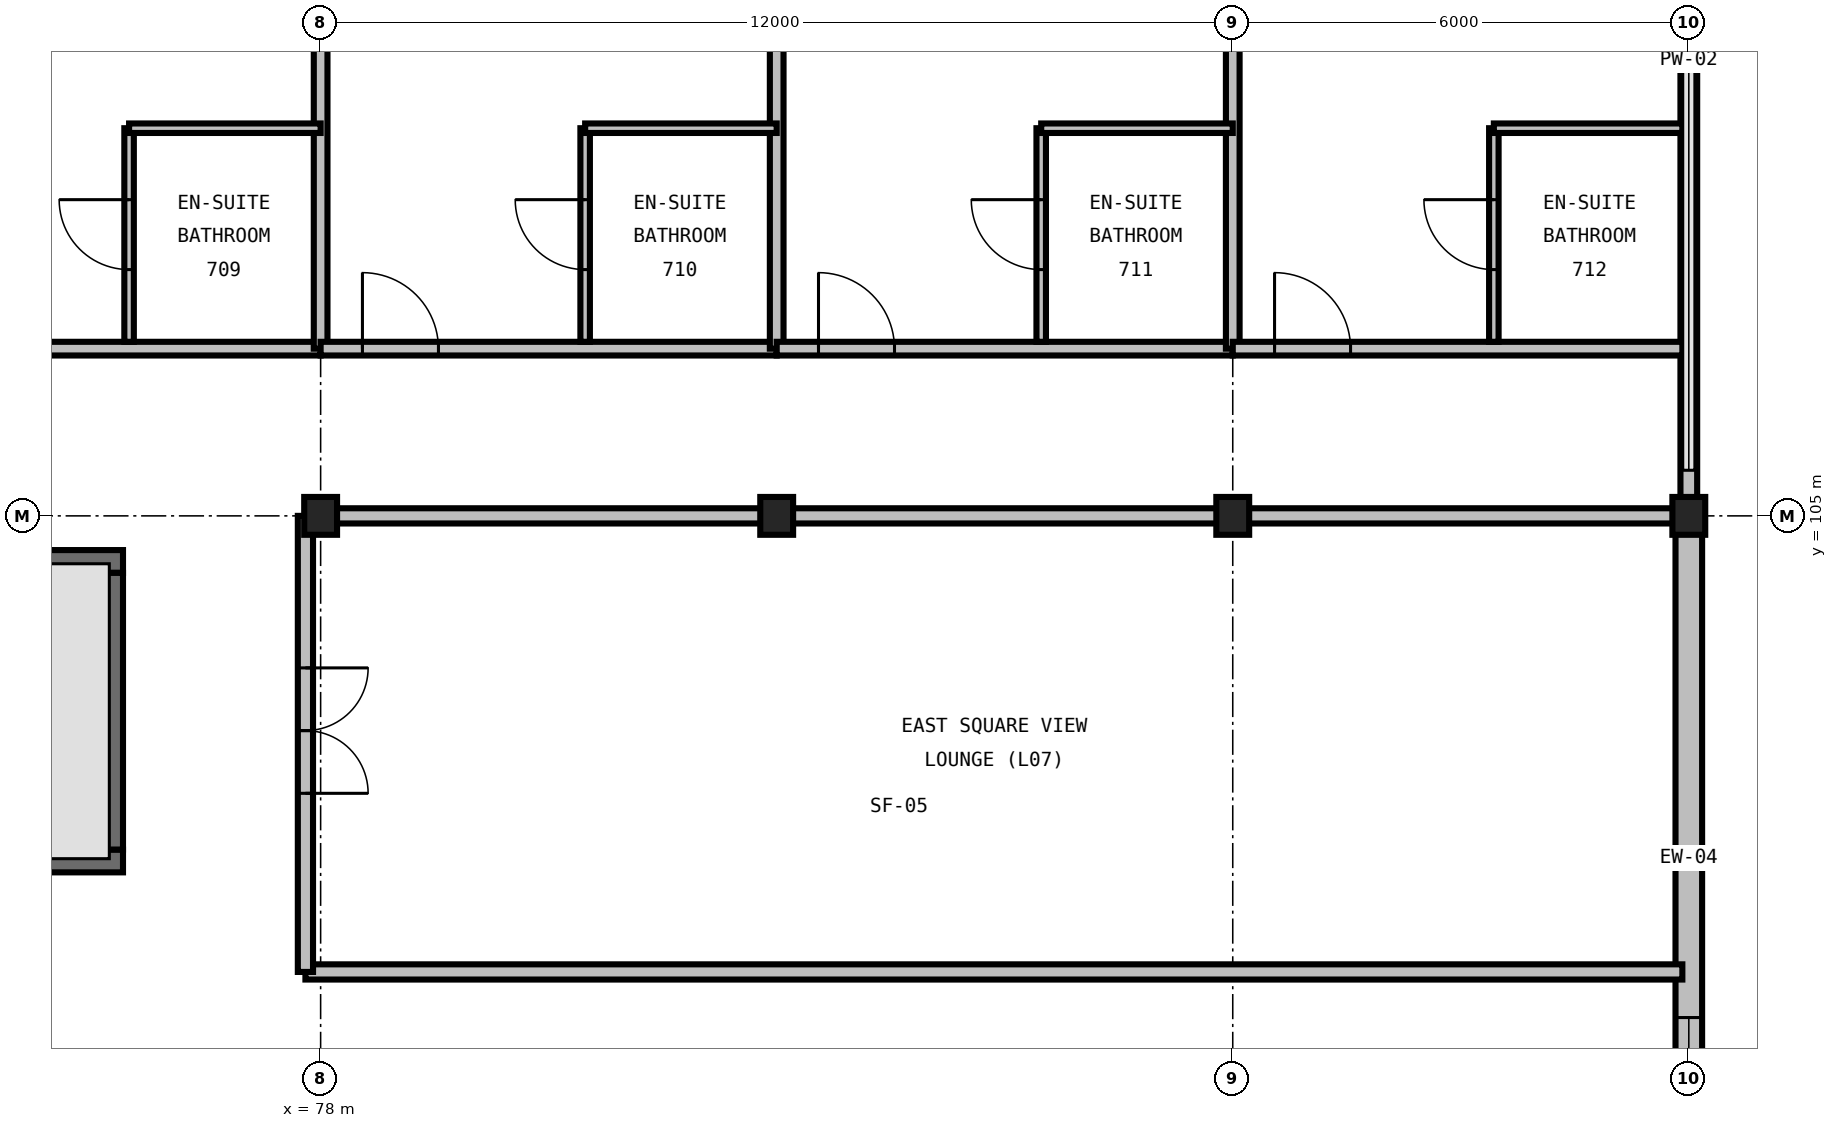
"""IFC4 building model, lengths in metres.
Left out: names, types, materials, properties, quantities, classifications, styles, units other than length and angle.
Written with IfcOpenShell. Run it as: python <this file> out.ifc"""

import sys

from ifc_helpers import new_model, si_unit, direction, frame, frame_2d, origin, origin_2d, place, context, subcontext, project, spatial, rectangle, i_section, extrude, element, fill, save


model = new_model("IFC4")
c1 = context("Model", 3, precision=1e-05, world=origin(), true_north=direction((0.0, 1.0)))
c2 = subcontext(c1, "Body", "Model", "MODEL_VIEW")
j1 = project(units=[si_unit("LENGTHUNIT", "METRE"), si_unit("PLANEANGLEUNIT", "RADIAN")], contexts=[c1])
p1 = place(None, origin())
s1 = spatial("IfcSite", under=j1, at=p1, CompositionType="ELEMENT")
p2 = place(p1, origin())
s2 = spatial("IfcBuilding", under=s1, at=p2, CompositionType="ELEMENT")
p3 = place(p2, frame((0.0, 0.0, 34.8)))
s3 = spatial("IfcBuildingStorey", under=s2, at=p3, CompositionType="ELEMENT", Elevation=34.8)
for number, where, z_axis, x_axis in (
    (1, (78.0, 105.0, 0.0), (0.0, 0.0, 1.0), (1.0, 0.0, 0.0)),
    (2, (84.0, 105.0, 0.0), (0.0, 0.0, 1.0), (1.0, 0.0, 0.0)),
    (3, (90.0, 105.0, 0.0), (0.0, 0.0, 1.0), (1.0, 0.0, 0.0)),
    (4, (96.0, 105.0, 0.0), (0.0, 0.0, 1.0), (1.0, 0.0, 0.0)),
):
    element("IfcColumn", number, at=place(p3, frame(where, z_axis=z_axis, x_axis=x_axis)), inside=s3, PredefinedType="COLUMN", context=c2, shape_type="SweptSolid", body=[
        extrude(i_section(OverallWidth=0.432, OverallDepth=0.498, WebThickness=0.056, FlangeThickness=0.089, FilletRadius=0.031, at=origin_2d()), origin(), (0.0, 0.0, 1.0), 3.6),
    ])
p4 = place(p3, frame((65.6, 100.46, 0.0), z_axis=(0.0, 0.0, 1.0), x_axis=(1.0, 0.0, 0.0)))
e5 = element("IfcWall", 5, at=p4, inside=s3, PredefinedType="SHEAR", context=c2, shape_type="SweptSolid", body=[
    extrude(rectangle(XDim=9.8, YDim=0.3, at=frame_2d((4.9, 0.0))), origin(), (0.0, 0.0, 1.0), 3.6),
])
p5 = place(p4, frame((0.45, 0.0, 0.0)))
e6 = element("IfcOpeningElement", 6, at=p5, cuts=e5, PredefinedType="OPENING", context=c2, shape_type="SweptSolid", body=[
    extrude(rectangle(XDim=1.1, YDim=2.2, at=frame_2d((0.55, 1.1))), frame((0.0, 0.165, 0.0), z_axis=(0.0, -1.0, 0.0), x_axis=(1.0, 0.0, 0.0)), (0.0, 0.0, 1.0), 0.33),
])
p6 = place(p3, frame((75.4, 104.4, 0.0), z_axis=(0.0, 0.0, 1.0), x_axis=(-1.0, 0.0, 0.0)))
e7 = element("IfcWall", 7, at=p6, inside=s3, PredefinedType="SHEAR", context=c2, shape_type="SweptSolid", body=[
    extrude(rectangle(XDim=9.8, YDim=0.3, at=frame_2d((4.9, 0.0))), origin(), (0.0, 0.0, 1.0), 3.6),
])
p7 = place(p3, frame((75.25, 100.61, 0.0), z_axis=(0.0, 0.0, 1.0), x_axis=(0.0, 1.0, 0.0)))
e8 = element("IfcWall", 8, at=p7, inside=s3, PredefinedType="SHEAR", context=c2, shape_type="SweptSolid", body=[
    extrude(rectangle(XDim=3.64, YDim=0.3, at=frame_2d((1.82, 0.0))), origin(), (0.0, 0.0, 1.0), 3.6),
])
p8 = place(p3, frame((96.0, 96.0, 0.0), z_axis=(0.0, 0.0, 1.0), x_axis=(0.0, 1.0, 0.0)))
e9 = element("IfcWall", 9, at=p8, inside=s3, PredefinedType="STANDARD", context=c2, shape_type="SweptSolid", body=[
    extrude(rectangle(XDim=9.0, YDim=0.35, at=frame_2d((4.5, 0.0))), origin(), (0.0, 0.0, 1.0), 2.981),
])
p9 = place(p8, frame((0.6, 0.0, 0.85)))
e10 = element("IfcOpeningElement", 10, at=p9, cuts=e9, PredefinedType="OPENING", context=c2, shape_type="SweptSolid", body=[
    extrude(rectangle(XDim=1.8, YDim=1.5, at=frame_2d((0.9, 0.75))), frame((0.0, 0.19, 0.0), z_axis=(0.0, -1.0, 0.0), x_axis=(1.0, 0.0, 0.0)), (0.0, 0.0, 1.0), 0.38),
])
p10 = place(p3, frame((96.0, 105.0, 0.0), z_axis=(0.0, 0.0, 1.0), x_axis=(0.0, 1.0, 0.0)))
e11 = element("IfcWall", 11, at=p10, inside=s3, PredefinedType="PARAPET", context=c2, shape_type="SweptSolid", body=[
    extrude(rectangle(XDim=12.0, YDim=0.22, at=frame_2d((6.0, 0.0))), origin(), (0.0, 0.0, 1.0), 0.2),
])
p11 = place(p3, frame((72.0, 107.2, 0.0), z_axis=(0.0, 0.0, 1.0), x_axis=(1.0, 0.0, 0.0)))
e12 = element("IfcWall", 12, at=p11, inside=s3, PredefinedType="PARTITIONING", context=c2, shape_type="SweptSolid", body=[
    extrude(rectangle(XDim=6.0, YDim=0.18, at=frame_2d((3.0, 0.0))), origin(), (0.0, 0.0, 1.0), 3.29),
])
p12 = place(p11, frame((0.55, 0.0, 0.0)))
e13 = element("IfcOpeningElement", 13, at=p12, cuts=e12, PredefinedType="OPENING", context=c2, shape_type="SweptSolid", body=[
    extrude(rectangle(XDim=1.0, YDim=2.15, at=frame_2d((0.5, 1.075))), frame((0.0, 0.105, 0.0), z_axis=(0.0, -1.0, 0.0), x_axis=(1.0, 0.0, 0.0)), (0.0, 0.0, 1.0), 0.21),
])
p13 = place(p3, frame((78.0, 107.2, 0.0), z_axis=(0.0, 0.0, 1.0), x_axis=(0.0, 1.0, 0.0)))
e14 = element("IfcWall", 14, at=p13, inside=s3, PredefinedType="PARTITIONING", context=c2, shape_type="SweptSolid", body=[
    extrude(rectangle(XDim=9.625, YDim=0.18, at=frame_2d((4.812, 0.0))), origin(), (0.0, 0.0, 1.0), 2.59),
])
p14 = place(p3, frame((75.48, 107.29, 0.0), z_axis=(0.0, 0.0, 1.0), x_axis=(0.0, 1.0, 0.0)))
e15 = element("IfcWall", 15, at=p14, inside=s3, PredefinedType="PARTITIONING", context=c2, shape_type="SweptSolid", body=[
    extrude(rectangle(XDim=2.81, YDim=0.125, at=frame_2d((1.405, 0.0))), origin(), (0.0, 0.0, 1.0), 3.29),
])
p15 = place(p14, frame((0.95, 0.0, 0.0)))
e16 = element("IfcOpeningElement", 16, at=p15, cuts=e15, PredefinedType="OPENING", context=c2, shape_type="SweptSolid", body=[
    extrude(rectangle(XDim=0.92, YDim=2.1, at=frame_2d((0.46, 1.05))), frame((0.0, 0.077, 0.0), z_axis=(0.0, -1.0, 0.0), x_axis=(1.0, 0.0, 0.0)), (0.0, 0.0, 1.0), 0.155),
])
p16 = place(p3, frame((75.48, 110.1, 0.0), z_axis=(0.0, 0.0, 1.0), x_axis=(1.0, 0.0, 0.0)))
e17 = element("IfcWall", 17, at=p16, inside=s3, PredefinedType="PARTITIONING", context=c2, shape_type="SweptSolid", body=[
    extrude(rectangle(XDim=2.52, YDim=0.125, at=frame_2d((1.26, 0.0))), origin(), (0.0, 0.0, 1.0), 3.29),
])
p17 = place(p3, frame((78.0, 107.2, 0.0), z_axis=(0.0, 0.0, 1.0), x_axis=(1.0, 0.0, 0.0)))
e18 = element("IfcWall", 18, at=p17, inside=s3, PredefinedType="PARTITIONING", context=c2, shape_type="SweptSolid", body=[
    extrude(rectangle(XDim=6.0, YDim=0.18, at=frame_2d((3.0, 0.0))), origin(), (0.0, 0.0, 1.0), 3.29),
])
p18 = place(p17, frame((0.55, 0.0, 0.0)))
e19 = element("IfcOpeningElement", 19, at=p18, cuts=e18, PredefinedType="OPENING", context=c2, shape_type="SweptSolid", body=[
    extrude(rectangle(XDim=1.0, YDim=2.15, at=frame_2d((0.5, 1.075))), frame((0.0, 0.105, 0.0), z_axis=(0.0, -1.0, 0.0), x_axis=(1.0, 0.0, 0.0)), (0.0, 0.0, 1.0), 0.21),
])
p19 = place(p3, frame((84.0, 107.2, 0.0), z_axis=(0.0, 0.0, 1.0), x_axis=(0.0, 1.0, 0.0)))
e20 = element("IfcWall", 20, at=p19, inside=s3, PredefinedType="PARTITIONING", context=c2, shape_type="SweptSolid", body=[
    extrude(rectangle(XDim=9.625, YDim=0.18, at=frame_2d((4.812, 0.0))), origin(), (0.0, 0.0, 1.0), 2.59),
])
p20 = place(p3, frame((81.48, 107.29, 0.0), z_axis=(0.0, 0.0, 1.0), x_axis=(0.0, 1.0, 0.0)))
e21 = element("IfcWall", 21, at=p20, inside=s3, PredefinedType="PARTITIONING", context=c2, shape_type="SweptSolid", body=[
    extrude(rectangle(XDim=2.81, YDim=0.125, at=frame_2d((1.405, 0.0))), origin(), (0.0, 0.0, 1.0), 3.29),
])
p21 = place(p20, frame((0.95, 0.0, 0.0)))
e22 = element("IfcOpeningElement", 22, at=p21, cuts=e21, PredefinedType="OPENING", context=c2, shape_type="SweptSolid", body=[
    extrude(rectangle(XDim=0.92, YDim=2.1, at=frame_2d((0.46, 1.05))), frame((0.0, 0.077, 0.0), z_axis=(0.0, -1.0, 0.0), x_axis=(1.0, 0.0, 0.0)), (0.0, 0.0, 1.0), 0.155),
])
p22 = place(p3, frame((81.48, 110.1, 0.0), z_axis=(0.0, 0.0, 1.0), x_axis=(1.0, 0.0, 0.0)))
e23 = element("IfcWall", 23, at=p22, inside=s3, PredefinedType="PARTITIONING", context=c2, shape_type="SweptSolid", body=[
    extrude(rectangle(XDim=2.52, YDim=0.125, at=frame_2d((1.26, 0.0))), origin(), (0.0, 0.0, 1.0), 3.29),
])
p23 = place(p3, frame((84.0, 107.2, 0.0), z_axis=(0.0, 0.0, 1.0), x_axis=(1.0, 0.0, 0.0)))
e24 = element("IfcWall", 24, at=p23, inside=s3, PredefinedType="PARTITIONING", context=c2, shape_type="SweptSolid", body=[
    extrude(rectangle(XDim=6.0, YDim=0.18, at=frame_2d((3.0, 0.0))), origin(), (0.0, 0.0, 1.0), 3.29),
])
p24 = place(p23, frame((0.55, 0.0, 0.0)))
e25 = element("IfcOpeningElement", 25, at=p24, cuts=e24, PredefinedType="OPENING", context=c2, shape_type="SweptSolid", body=[
    extrude(rectangle(XDim=1.0, YDim=2.15, at=frame_2d((0.5, 1.075))), frame((0.0, 0.105, 0.0), z_axis=(0.0, -1.0, 0.0), x_axis=(1.0, 0.0, 0.0)), (0.0, 0.0, 1.0), 0.21),
])
p25 = place(p3, frame((90.0, 107.2, 0.0), z_axis=(0.0, 0.0, 1.0), x_axis=(0.0, 1.0, 0.0)))
e26 = element("IfcWall", 26, at=p25, inside=s3, PredefinedType="PARTITIONING", context=c2, shape_type="SweptSolid", body=[
    extrude(rectangle(XDim=9.625, YDim=0.18, at=frame_2d((4.812, 0.0))), origin(), (0.0, 0.0, 1.0), 2.59),
])
p26 = place(p3, frame((87.48, 107.29, 0.0), z_axis=(0.0, 0.0, 1.0), x_axis=(0.0, 1.0, 0.0)))
e27 = element("IfcWall", 27, at=p26, inside=s3, PredefinedType="PARTITIONING", context=c2, shape_type="SweptSolid", body=[
    extrude(rectangle(XDim=2.81, YDim=0.125, at=frame_2d((1.405, 0.0))), origin(), (0.0, 0.0, 1.0), 3.29),
])
p27 = place(p26, frame((0.95, 0.0, 0.0)))
e28 = element("IfcOpeningElement", 28, at=p27, cuts=e27, PredefinedType="OPENING", context=c2, shape_type="SweptSolid", body=[
    extrude(rectangle(XDim=0.92, YDim=2.1, at=frame_2d((0.46, 1.05))), frame((0.0, 0.077, 0.0), z_axis=(0.0, -1.0, 0.0), x_axis=(1.0, 0.0, 0.0)), (0.0, 0.0, 1.0), 0.155),
])
p28 = place(p3, frame((87.48, 110.1, 0.0), z_axis=(0.0, 0.0, 1.0), x_axis=(1.0, 0.0, 0.0)))
e29 = element("IfcWall", 29, at=p28, inside=s3, PredefinedType="PARTITIONING", context=c2, shape_type="SweptSolid", body=[
    extrude(rectangle(XDim=2.52, YDim=0.125, at=frame_2d((1.26, 0.0))), origin(), (0.0, 0.0, 1.0), 3.29),
])
p29 = place(p3, frame((90.0, 107.2, 0.0), z_axis=(0.0, 0.0, 1.0), x_axis=(1.0, 0.0, 0.0)))
e30 = element("IfcWall", 30, at=p29, inside=s3, PredefinedType="PARTITIONING", context=c2, shape_type="SweptSolid", body=[
    extrude(rectangle(XDim=5.915, YDim=0.18, at=frame_2d((2.957, 0.0))), origin(), (0.0, 0.0, 1.0), 3.29),
])
p30 = place(p29, frame((0.55, 0.0, 0.0)))
e31 = element("IfcOpeningElement", 31, at=p30, cuts=e30, PredefinedType="OPENING", context=c2, shape_type="SweptSolid", body=[
    extrude(rectangle(XDim=1.0, YDim=2.15, at=frame_2d((0.5, 1.075))), frame((0.0, 0.105, 0.0), z_axis=(0.0, -1.0, 0.0), x_axis=(1.0, 0.0, 0.0)), (0.0, 0.0, 1.0), 0.21),
])
p31 = place(p3, frame((93.435, 107.29, 0.0), z_axis=(0.0, 0.0, 1.0), x_axis=(0.0, 1.0, 0.0)))
e32 = element("IfcWall", 32, at=p31, inside=s3, PredefinedType="PARTITIONING", context=c2, shape_type="SweptSolid", body=[
    extrude(rectangle(XDim=2.81, YDim=0.125, at=frame_2d((1.405, 0.0))), origin(), (0.0, 0.0, 1.0), 3.29),
])
p32 = place(p31, frame((0.95, 0.0, 0.0)))
e33 = element("IfcOpeningElement", 33, at=p32, cuts=e32, PredefinedType="OPENING", context=c2, shape_type="SweptSolid", body=[
    extrude(rectangle(XDim=0.92, YDim=2.1, at=frame_2d((0.46, 1.05))), frame((0.0, 0.077, 0.0), z_axis=(0.0, -1.0, 0.0), x_axis=(1.0, 0.0, 0.0)), (0.0, 0.0, 1.0), 0.155),
])
p33 = place(p3, frame((93.435, 110.1, 0.0), z_axis=(0.0, 0.0, 1.0), x_axis=(1.0, 0.0, 0.0)))
e34 = element("IfcWall", 34, at=p33, inside=s3, PredefinedType="PARTITIONING", context=c2, shape_type="SweptSolid", body=[
    extrude(rectangle(XDim=2.48, YDim=0.125, at=frame_2d((1.24, 0.0))), origin(), (0.0, 0.0, 1.0), 3.29),
])
p34 = place(p3, frame((77.8, 99.0, 0.0), z_axis=(0.0, 0.0, 1.0), x_axis=(1.0, 0.0, 0.0)))
e35 = element("IfcWall", 35, at=p34, inside=s3, PredefinedType="PARTITIONING", context=c2, shape_type="SweptSolid", body=[
    extrude(rectangle(XDim=18.115, YDim=0.2, at=frame_2d((9.057, 0.0))), origin(), (0.0, 0.0, 1.0), 3.29),
])
p35 = place(p3, frame((95.915, 105.0, 0.0), z_axis=(0.0, 0.0, 1.0), x_axis=(-1.0, 0.0, 0.0)))
e36 = element("IfcWall", 36, at=p35, inside=s3, PredefinedType="PARTITIONING", context=c2, shape_type="SweptSolid", body=[
    extrude(rectangle(XDim=18.115, YDim=0.2, at=frame_2d((9.057, 0.0))), origin(), (0.0, 0.0, 1.0), 2.736),
])
p36 = place(p3, frame((77.8, 105.0, 0.0), z_axis=(0.0, 0.0, 1.0), x_axis=(0.0, -1.0, 0.0)))
e37 = element("IfcWall", 37, at=p36, inside=s3, PredefinedType="PARTITIONING", context=c2, shape_type="SweptSolid", body=[
    extrude(rectangle(XDim=6.0, YDim=0.2, at=frame_2d((3.0, 0.0))), origin(), (0.0, 0.0, 1.0), 3.29),
])
p37 = place(p36, frame((2.0, 0.0, 0.0)))
e38 = element("IfcOpeningElement", 38, at=p37, cuts=e37, PredefinedType="OPENING", context=c2, shape_type="SweptSolid", body=[
    extrude(rectangle(XDim=1.65, YDim=2.25, at=frame_2d((0.825, 1.125))), frame((0.0, 0.115, 0.0), z_axis=(0.0, -1.0, 0.0), x_axis=(1.0, 0.0, 0.0)), (0.0, 0.0, 1.0), 0.23),
])
p38 = place(p9, origin())
e39 = element("IfcWindow", 39, at=p38, inside=s3, PartitioningType="SINGLE_PANEL", PredefinedType="WINDOW", context=c2, shape_type="SweptSolid", body=[
    extrude(rectangle(XDim=1.8, YDim=1.5, at=frame_2d((0.9, 0.75))), frame((0.0, 0.03, 0.0), z_axis=(0.0, -1.0, 0.0), x_axis=(1.0, 0.0, 0.0)), (0.0, 0.0, 1.0), 0.06),
])
fill(e10, e39)
p39 = place(p15, origin())
e40 = element("IfcDoor", 40, at=p39, inside=s3, OperationType="SINGLE_SWING_RIGHT", PredefinedType="DOOR", context=c2, shape_type="SweptSolid", body=[
    extrude(rectangle(XDim=0.92, YDim=2.1, at=frame_2d((0.46, 1.05))), frame((0.0, 0.025, 0.0), z_axis=(0.0, -1.0, 0.0), x_axis=(1.0, 0.0, 0.0)), (0.0, 0.0, 1.0), 0.05),
])
fill(e16, e40)
p40 = place(p18, origin())
e41 = element("IfcDoor", 41, at=p40, inside=s3, OperationType="SINGLE_SWING_LEFT", PredefinedType="DOOR", context=c2, shape_type="SweptSolid", body=[
    extrude(rectangle(XDim=1.0, YDim=2.15, at=frame_2d((0.5, 1.075))), frame((0.0, 0.025, 0.0), z_axis=(0.0, -1.0, 0.0), x_axis=(1.0, 0.0, 0.0)), (0.0, 0.0, 1.0), 0.05),
])
fill(e19, e41)
p41 = place(p21, origin())
e42 = element("IfcDoor", 42, at=p41, inside=s3, OperationType="SINGLE_SWING_RIGHT", PredefinedType="DOOR", context=c2, shape_type="SweptSolid", body=[
    extrude(rectangle(XDim=0.92, YDim=2.1, at=frame_2d((0.46, 1.05))), frame((0.0, 0.025, 0.0), z_axis=(0.0, -1.0, 0.0), x_axis=(1.0, 0.0, 0.0)), (0.0, 0.0, 1.0), 0.05),
])
fill(e22, e42)
p42 = place(p24, origin())
e43 = element("IfcDoor", 43, at=p42, inside=s3, OperationType="SINGLE_SWING_LEFT", PredefinedType="DOOR", context=c2, shape_type="SweptSolid", body=[
    extrude(rectangle(XDim=1.0, YDim=2.15, at=frame_2d((0.5, 1.075))), frame((0.0, 0.025, 0.0), z_axis=(0.0, -1.0, 0.0), x_axis=(1.0, 0.0, 0.0)), (0.0, 0.0, 1.0), 0.05),
])
fill(e25, e43)
p43 = place(p27, origin())
e44 = element("IfcDoor", 44, at=p43, inside=s3, OperationType="SINGLE_SWING_RIGHT", PredefinedType="DOOR", context=c2, shape_type="SweptSolid", body=[
    extrude(rectangle(XDim=0.92, YDim=2.1, at=frame_2d((0.46, 1.05))), frame((0.0, 0.025, 0.0), z_axis=(0.0, -1.0, 0.0), x_axis=(1.0, 0.0, 0.0)), (0.0, 0.0, 1.0), 0.05),
])
fill(e28, e44)
p44 = place(p30, origin())
e45 = element("IfcDoor", 45, at=p44, inside=s3, OperationType="SINGLE_SWING_LEFT", PredefinedType="DOOR", context=c2, shape_type="SweptSolid", body=[
    extrude(rectangle(XDim=1.0, YDim=2.15, at=frame_2d((0.5, 1.075))), frame((0.0, 0.025, 0.0), z_axis=(0.0, -1.0, 0.0), x_axis=(1.0, 0.0, 0.0)), (0.0, 0.0, 1.0), 0.05),
])
fill(e31, e45)
p45 = place(p32, origin())
e46 = element("IfcDoor", 46, at=p45, inside=s3, OperationType="SINGLE_SWING_RIGHT", PredefinedType="DOOR", context=c2, shape_type="SweptSolid", body=[
    extrude(rectangle(XDim=0.92, YDim=2.1, at=frame_2d((0.46, 1.05))), frame((0.0, 0.025, 0.0), z_axis=(0.0, -1.0, 0.0), x_axis=(1.0, 0.0, 0.0)), (0.0, 0.0, 1.0), 0.05),
])
fill(e33, e46)
p46 = place(p37, origin())
e47 = element("IfcDoor", 47, at=p46, inside=s3, OperationType="DOUBLE_DOOR_SINGLE_SWING", PredefinedType="DOOR", context=c2, shape_type="SweptSolid", body=[
    extrude(rectangle(XDim=1.65, YDim=2.25, at=frame_2d((0.825, 1.125))), frame((0.0, 0.025, 0.0), z_axis=(0.0, -1.0, 0.0), x_axis=(1.0, 0.0, 0.0)), (0.0, 0.0, 1.0), 0.05),
])
fill(e38, e47)
save(model, sys.argv[1])
